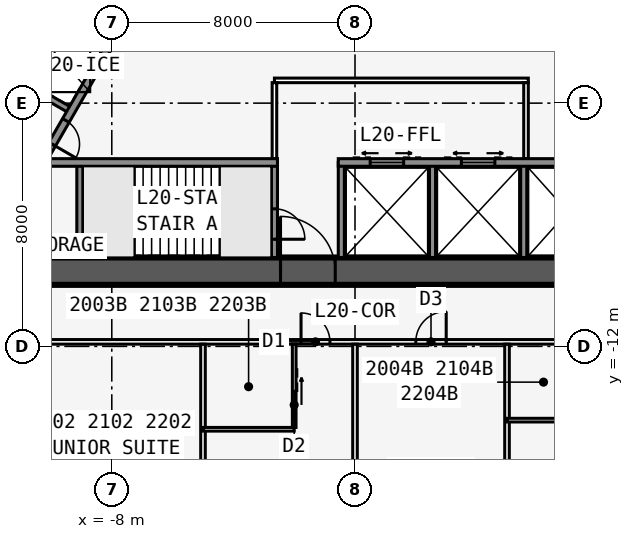
"""IFC4 building model, lengths in metres.
Left out: names, types, materials, properties, quantities, classifications, styles, units other than length and angle.
Written with IfcOpenShell. Run it as: python <this file> out.ifc"""

import sys

from ifc_helpers import new_model, si_unit, direction, frame, frame_2d, origin, place, context, subcontext, project, spatial, rectangle, extrude, element, fill, save


model = new_model("IFC4")
c1 = context("Model", 3, precision=1e-05, world=origin(), true_north=direction((0.0, 1.0)))
c2 = subcontext(c1, "Body", "Model", "MODEL_VIEW")
j1 = project(units=[si_unit("LENGTHUNIT", "METRE"), si_unit("PLANEANGLEUNIT", "RADIAN")], contexts=[c1])
p1 = place(None, origin())
s1 = spatial("IfcSite", under=j1, at=p1, CompositionType="ELEMENT")
p2 = place(p1, origin())
s2 = spatial("IfcBuilding", under=s1, at=p2, CompositionType="ELEMENT")
p3 = place(p2, frame((0.0, 0.0, 79.5)))
s3 = spatial("IfcBuildingStorey", under=s2, at=p3, CompositionType="ELEMENT", Elevation=79.5)
p4 = place(p3, frame((-16.5, -9.526, 0.0), z_axis=(0.0, 0.0, 1.0), x_axis=(1.0, 0.0, 0.0)))
e1 = element("IfcWall", 1, at=p4, inside=s3, PredefinedType="SHEAR", context=c2, shape_type="SweptSolid", body=[
    extrude(rectangle(XDim=33.0, YDim=0.9, at=frame_2d((16.5, 0.0))), origin(), (0.0, 0.0, 1.0), 3.4),
])
p5 = place(p4, frame((14.05, 0.0, 0.0)))
e2 = element("IfcOpeningElement", 2, at=p5, cuts=e1, PredefinedType="OPENING", context=c2, shape_type="SweptSolid", body=[
    extrude(rectangle(XDim=1.8, YDim=2.13, at=frame_2d((0.9, 1.065))), frame((0.0, 0.46, 0.0), z_axis=(0.0, -1.0, 0.0), x_axis=(1.0, 0.0, 0.0)), (0.0, 0.0, 1.0), 0.92),
])
p6 = place(p3, frame((-10.183, -5.951, 0.0), z_axis=(0.0, 0.0, 1.0), x_axis=(1.0, 0.0, 0.0)))
e3 = element("IfcWall", 3, at=p6, inside=s3, PredefinedType="SOLIDWALL", context=c2, shape_type="SweptSolid", body=[
    extrude(rectangle(XDim=7.633, YDim=0.25, at=frame_2d((3.816, 0.0))), origin(), (0.0, 0.0, 1.0), 3.235),
])
p7 = place(p3, frame((-0.55, -5.951, 0.0), z_axis=(0.0, 0.0, 1.0), x_axis=(1.0, 0.0, 0.0)))
e4 = element("IfcWall", 4, at=p7, inside=s3, PredefinedType="SOLIDWALL", context=c2, shape_type="SweptSolid", body=[
    extrude(rectangle(XDim=10.733, YDim=0.25, at=frame_2d((5.366, 0.0))), origin(), (0.0, 0.0, 1.0), 3.235),
])
p8 = place(p7, frame((9.314, 0.0, 0.0)))
e5 = element("IfcOpeningElement", 5, at=p8, cuts=e4, PredefinedType="OPENING", context=c2, shape_type="SweptSolid", body=[
    extrude(rectangle(XDim=0.9, YDim=2.13, at=frame_2d((0.45, 1.065))), frame((0.0, 0.135, 0.0), z_axis=(0.0, -1.0, 0.0), x_axis=(1.0, 0.0, 0.0)), (0.0, 0.0, 1.0), 0.27),
])
p9 = place(p7, frame((1.05, 0.0, 0.0)))
e6 = element("IfcOpeningElement", 6, at=p9, cuts=e4, PredefinedType="OPENING", context=c2, shape_type="SweptSolid", body=[
    extrude(rectangle(XDim=1.1, YDim=2.13, at=frame_2d((0.55, 1.065))), frame((0.0, 0.135, 0.0), z_axis=(0.0, -1.0, 0.0), x_axis=(1.0, 0.0, 0.0)), (0.0, 0.0, 1.0), 0.27),
])
p10 = place(p7, frame((4.05, 0.0, 0.0)))
e7 = element("IfcOpeningElement", 7, at=p10, cuts=e4, PredefinedType="OPENING", context=c2, shape_type="SweptSolid", body=[
    extrude(rectangle(XDim=1.1, YDim=2.13, at=frame_2d((0.55, 1.065))), frame((0.0, 0.135, 0.0), z_axis=(0.0, -1.0, 0.0), x_axis=(1.0, 0.0, 0.0)), (0.0, 0.0, 1.0), 0.27),
])
p11 = place(p3, frame((-9.05, -5.951, 0.0), z_axis=(0.0, 0.0, 1.0), x_axis=(0.0, -1.0, 0.0)))
e8 = element("IfcWall", 8, at=p11, inside=s3, PredefinedType="SOLIDWALL", context=c2, shape_type="SweptSolid", body=[
    extrude(rectangle(XDim=3.125, YDim=0.2, at=frame_2d((1.562, 0.0))), origin(), (0.0, 0.0, 1.0), 3.235),
])
p12 = place(p3, frame((-2.65, -5.951, 0.0), z_axis=(0.0, 0.0, 1.0), x_axis=(0.0, -1.0, 0.0)))
e9 = element("IfcWall", 9, at=p12, inside=s3, PredefinedType="SOLIDWALL", context=c2, shape_type="SweptSolid", body=[
    extrude(rectangle(XDim=3.125, YDim=0.2, at=frame_2d((1.562, 0.0))), origin(), (0.0, 0.0, 1.0), 3.235),
])
p13 = place(p12, frame((1.525, 0.0, 0.0)))
e10 = element("IfcOpeningElement", 10, at=p13, cuts=e9, PredefinedType="OPENING", context=c2, shape_type="SweptSolid", body=[
    extrude(rectangle(XDim=1.0, YDim=2.13, at=frame_2d((0.5, 1.065))), frame((0.0, 0.11, 0.0), z_axis=(0.0, -1.0, 0.0), x_axis=(1.0, 0.0, 0.0)), (0.0, 0.0, 1.0), 0.22),
])
for number, where, z_axis, x_axis in (
    (11, (-0.45, -5.951, 0.0), (0.0, 0.0, 1.0), (0.0, -1.0, 0.0)),
    (12, (2.55, -5.951, 0.0), (0.0, 0.0, 1.0), (0.0, -1.0, 0.0)),
    (13, (5.55, -5.951, 0.0), (0.0, 0.0, 1.0), (0.0, -1.0, 0.0)),
):
    element("IfcWall", number, at=place(p3, frame(where, z_axis=z_axis, x_axis=x_axis)), inside=s3, PredefinedType="SOLIDWALL", context=c2, shape_type="SweptSolid", body=[
        extrude(rectangle(XDim=3.125, YDim=0.2, at=frame_2d((1.562, 0.0))), origin(), (0.0, 0.0, 1.0), 3.235),
    ])
p14 = place(p3, frame((16.5, -9.526, 0.0), z_axis=(0.0, 0.0, 1.0), x_axis=(-0.499999749417, 0.866025548458, 0.0)))
e14 = element("IfcWall", 14, at=p14, inside=s3, PredefinedType="SHEAR", context=c2, shape_type="SweptSolid", body=[
    extrude(rectangle(XDim=33.0, YDim=0.9, at=frame_2d((16.5, 0.0))), origin(), (0.0, 0.0, 1.0), 3.4),
])
p15 = place(p14, frame((14.15, 0.0, 0.0)))
e15 = element("IfcOpeningElement", 15, at=p15, cuts=e14, PredefinedType="OPENING", context=c2, shape_type="SweptSolid", body=[
    extrude(rectangle(XDim=1.8, YDim=2.13, at=frame_2d((0.9, 1.065))), frame((0.0, 0.46, 0.0), z_axis=(0.0, -1.0, 0.0), x_axis=(1.0, 0.0, 0.0)), (0.0, 0.0, 1.0), 0.92),
])
p16 = place(p14, frame((12.6, 0.0, 0.0)))
e16 = element("IfcOpeningElement", 16, at=p16, cuts=e14, PredefinedType="OPENING", context=c2, shape_type="SweptSolid", body=[
    extrude(rectangle(XDim=1.0, YDim=2.13, at=frame_2d((0.5, 1.065))), frame((0.0, 0.46, 0.0), z_axis=(0.0, -1.0, 0.0), x_axis=(1.0, 0.0, 0.0)), (0.0, 0.0, 1.0), 0.92),
])
p17 = place(p3, frame((10.245, -5.843, 0.0), z_axis=(0.0, 0.0, 1.0), x_axis=(-0.499993009313, 0.866029439822, 0.0)))
e17 = element("IfcWall", 17, at=p17, inside=s3, PredefinedType="SOLIDWALL", context=c2, shape_type="SweptSolid", body=[
    extrude(rectangle(XDim=7.733, YDim=0.25, at=frame_2d((3.866, 0.0))), origin(), (0.0, 0.0, 1.0), 3.235),
])
p18 = place(p3, frame((0.0, 19.052, 0.0), z_axis=(0.0, 0.0, 1.0), x_axis=(-0.499999749417, -0.866025548458, 0.0)))
e18 = element("IfcWall", 18, at=p18, inside=s3, PredefinedType="SHEAR", context=c2, shape_type="SweptSolid", body=[
    extrude(rectangle(XDim=33.0, YDim=0.9, at=frame_2d((16.5, 0.0))), origin(), (0.0, 0.0, 1.0), 3.4),
])
p19 = place(p18, frame((14.15, 0.0, 0.0)))
e19 = element("IfcOpeningElement", 19, at=p19, cuts=e18, PredefinedType="OPENING", context=c2, shape_type="SweptSolid", body=[
    extrude(rectangle(XDim=1.8, YDim=2.13, at=frame_2d((0.9, 1.065))), frame((0.0, 0.46, 0.0), z_axis=(0.0, -1.0, 0.0), x_axis=(1.0, 0.0, 0.0)), (0.0, 0.0, 1.0), 0.92),
])
p20 = place(p18, frame((12.6, 0.0, 0.0)))
e20 = element("IfcOpeningElement", 20, at=p20, cuts=e18, PredefinedType="OPENING", context=c2, shape_type="SweptSolid", body=[
    extrude(rectangle(XDim=1.0, YDim=2.13, at=frame_2d((0.5, 1.065))), frame((0.0, 0.46, 0.0), z_axis=(0.0, -1.0, 0.0), x_axis=(1.0, 0.0, 0.0)), (0.0, 0.0, 1.0), 0.92),
])
p21 = place(p3, frame((-4.929, 3.365, 0.0), z_axis=(0.0, 0.0, 1.0), x_axis=(-0.499991433582, -0.866030349552, 0.0)))
e21 = element("IfcWall", 21, at=p21, inside=s3, PredefinedType="SOLIDWALL", context=c2, shape_type="SweptSolid", body=[
    extrude(rectangle(XDim=10.633, YDim=0.25, at=frame_2d((5.316, 0.0))), origin(), (0.0, 0.0, 1.0), 3.235),
])
p22 = place(p21, frame((9.164, 0.0, 0.0)))
e22 = element("IfcOpeningElement", 22, at=p22, cuts=e21, PredefinedType="OPENING", context=c2, shape_type="SweptSolid", body=[
    extrude(rectangle(XDim=0.9, YDim=2.13, at=frame_2d((0.45, 1.065))), frame((0.0, 0.135, 0.0), z_axis=(0.0, -1.0, 0.0), x_axis=(1.0, 0.0, 0.0)), (0.0, 0.0, 1.0), 0.27),
])
p23 = place(p3, frame((-9.329, -4.256, 0.0), z_axis=(0.0, 0.0, 1.0), x_axis=(-0.866022959057, 0.500004234368, 0.0)))
e23 = element("IfcWall", 23, at=p23, inside=s3, PredefinedType="SOLIDWALL", context=c2, shape_type="SweptSolid", body=[
    extrude(rectangle(XDim=3.125, YDim=0.2, at=frame_2d((1.562, 0.0))), origin(), (0.0, 0.0, 1.0), 3.235),
])
p24 = place(p3, frame((-19.527, -11.851, 0.0), z_axis=(0.0, 0.0, 1.0), x_axis=(1.0, 0.0, 0.0)))
e24 = element("IfcWall", 24, at=p24, inside=s3, PredefinedType="PARTITIONING", context=c2, shape_type="SweptSolid", body=[
    extrude(rectangle(XDim=39.054, YDim=0.15, at=frame_2d((19.527, 0.0))), origin(), (0.0, 0.0, 1.0), 3.235),
])
p25 = place(p24, frame((0.352, 0.0, 0.0)))
e25 = element("IfcOpeningElement", 25, at=p25, cuts=e24, PredefinedType="OPENING", context=c2, shape_type="SweptSolid", body=[
    extrude(rectangle(XDim=0.95, YDim=2.13, at=frame_2d((0.475, 1.065))), frame((0.0, 0.085, 0.0), z_axis=(0.0, -1.0, 0.0), x_axis=(1.0, 0.0, 0.0)), (0.0, 0.0, 1.0), 0.17),
])
p26 = place(p24, frame((7.752, 0.0, 0.0)))
e26 = element("IfcOpeningElement", 26, at=p26, cuts=e24, PredefinedType="OPENING", context=c2, shape_type="SweptSolid", body=[
    extrude(rectangle(XDim=0.95, YDim=2.13, at=frame_2d((0.475, 1.065))), frame((0.0, 0.085, 0.0), z_axis=(0.0, -1.0, 0.0), x_axis=(1.0, 0.0, 0.0)), (0.0, 0.0, 1.0), 0.17),
])
p27 = place(p24, frame((17.752, 0.0, 0.0)))
e27 = element("IfcOpeningElement", 27, at=p27, cuts=e24, PredefinedType="OPENING", context=c2, shape_type="SweptSolid", body=[
    extrude(rectangle(XDim=0.95, YDim=2.13, at=frame_2d((0.475, 1.065))), frame((0.0, 0.085, 0.0), z_axis=(0.0, -1.0, 0.0), x_axis=(1.0, 0.0, 0.0)), (0.0, 0.0, 1.0), 0.17),
])
p28 = place(p24, frame((21.527, 0.0, 0.0)))
e28 = element("IfcOpeningElement", 28, at=p28, cuts=e24, PredefinedType="OPENING", context=c2, shape_type="SweptSolid", body=[
    extrude(rectangle(XDim=1.0, YDim=2.13, at=frame_2d((0.5, 1.065))), frame((0.0, 0.085, 0.0), z_axis=(0.0, -1.0, 0.0), x_axis=(1.0, 0.0, 0.0)), (0.0, 0.0, 1.0), 0.17),
])
p29 = place(p24, frame((27.152, 0.0, 0.0)))
e29 = element("IfcOpeningElement", 29, at=p29, cuts=e24, PredefinedType="OPENING", context=c2, shape_type="SweptSolid", body=[
    extrude(rectangle(XDim=0.95, YDim=2.13, at=frame_2d((0.475, 1.065))), frame((0.0, 0.085, 0.0), z_axis=(0.0, -1.0, 0.0), x_axis=(1.0, 0.0, 0.0)), (0.0, 0.0, 1.0), 0.17),
])
p30 = place(p24, frame((32.152, 0.0, 0.0)))
e30 = element("IfcOpeningElement", 30, at=p30, cuts=e24, PredefinedType="OPENING", context=c2, shape_type="SweptSolid", body=[
    extrude(rectangle(XDim=0.95, YDim=2.13, at=frame_2d((0.475, 1.065))), frame((0.0, 0.085, 0.0), z_axis=(0.0, -1.0, 0.0), x_axis=(1.0, 0.0, 0.0)), (0.0, 0.0, 1.0), 0.17),
])
p31 = place(p24, frame((37.752, 0.0, 0.0)))
e31 = element("IfcOpeningElement", 31, at=p31, cuts=e24, PredefinedType="OPENING", context=c2, shape_type="SweptSolid", body=[
    extrude(rectangle(XDim=0.95, YDim=2.13, at=frame_2d((0.475, 1.065))), frame((0.0, 0.085, 0.0), z_axis=(0.0, -1.0, 0.0), x_axis=(1.0, 0.0, 0.0)), (0.0, 0.0, 1.0), 0.17),
])
p32 = place(p3, frame((-5.0, -11.926, 0.0), z_axis=(0.0, 0.0, 1.0), x_axis=(0.0, -1.0, 0.0)))
e32 = element("IfcWall", 32, at=p32, inside=s3, PredefinedType="PARTITIONING", context=c2, shape_type="SweptSolid", body=[
    extrude(rectangle(XDim=9.943, YDim=0.15, at=frame_2d((4.972, 0.0))), origin(), (0.0, 0.0, 1.0), 2.389),
])
p33 = place(p3, frame((0.0, -11.926, 0.0), z_axis=(0.0, 0.0, 1.0), x_axis=(0.0, -1.0, 0.0)))
e33 = element("IfcWall", 33, at=p33, inside=s3, PredefinedType="PARTITIONING", context=c2, shape_type="SweptSolid", body=[
    extrude(rectangle(XDim=10.096, YDim=0.15, at=frame_2d((5.048, 0.0))), origin(), (0.0, 0.0, 1.0), 2.389),
])
p34 = place(p3, frame((5.0, -11.926, 0.0), z_axis=(0.0, 0.0, 1.0), x_axis=(0.0, -1.0, 0.0)))
e34 = element("IfcWall", 34, at=p34, inside=s3, PredefinedType="PARTITIONING", context=c2, shape_type="SweptSolid", body=[
    extrude(rectangle(XDim=9.943, YDim=0.15, at=frame_2d((4.972, 0.0))), origin(), (0.0, 0.0, 1.0), 2.389),
])
p35 = place(p3, frame((-5.0, -14.726, 0.0), z_axis=(0.0, 0.0, 1.0), x_axis=(1.0, 0.0, 0.0)))
e35 = element("IfcWall", 35, at=p35, inside=s3, PredefinedType="PLUMBINGWALL", context=c2, shape_type="SweptSolid", body=[
    extrude(rectangle(XDim=3.0, YDim=0.12, at=frame_2d((1.5, 0.0))), origin(), (0.0, 0.0, 1.0), 3.235),
])
p36 = place(p3, frame((-2.0, -11.926, 0.0), z_axis=(0.0, 0.0, 1.0), x_axis=(0.0, -1.0, 0.0)))
e36 = element("IfcWall", 36, at=p36, inside=s3, PredefinedType="PLUMBINGWALL", context=c2, shape_type="SweptSolid", body=[
    extrude(rectangle(XDim=2.74, YDim=0.12, at=frame_2d((1.37, 0.0))), origin(), (0.0, 0.0, 1.0), 3.235),
])
p37 = place(p36, frame((1.55, 0.0, 0.0)))
e37 = element("IfcOpeningElement", 37, at=p37, cuts=e36, PredefinedType="OPENING", context=c2, shape_type="SweptSolid", body=[
    extrude(rectangle(XDim=0.9, YDim=2.13, at=frame_2d((0.45, 1.065))), frame((0.0, 0.07, 0.0), z_axis=(0.0, -1.0, 0.0), x_axis=(1.0, 0.0, 0.0)), (0.0, 0.0, 1.0), 0.14),
])
p38 = place(p3, frame((5.0, -14.426, 0.0), z_axis=(0.0, 0.0, 1.0), x_axis=(1.0, 0.0, 0.0)))
e38 = element("IfcWall", 38, at=p38, inside=s3, PredefinedType="PLUMBINGWALL", context=c2, shape_type="SweptSolid", body=[
    extrude(rectangle(XDim=2.4, YDim=0.12, at=frame_2d((1.2, 0.0))), origin(), (0.0, 0.0, 1.0), 3.235),
])
p39 = place(p3, frame((21.586, -11.885, 0.0), z_axis=(0.0, 0.0, 1.0), x_axis=(-0.500001915564, 0.86602429783, 0.0)))
e39 = element("IfcWall", 39, at=p39, inside=s3, PredefinedType="PARTITIONING", context=c2, shape_type="SweptSolid", body=[
    extrude(rectangle(XDim=42.172, YDim=0.15, at=frame_2d((21.086, 0.0))), origin(), (0.0, 0.0, 1.0), 3.235),
])
p40 = place(p39, frame((1.911, 0.0, 0.0)))
e40 = element("IfcOpeningElement", 40, at=p40, cuts=e39, PredefinedType="OPENING", context=c2, shape_type="SweptSolid", body=[
    extrude(rectangle(XDim=0.95, YDim=2.13, at=frame_2d((0.475, 1.065))), frame((0.0, 0.085, 0.0), z_axis=(0.0, -1.0, 0.0), x_axis=(1.0, 0.0, 0.0)), (0.0, 0.0, 1.0), 0.17),
])
p41 = place(p39, frame((8.711, 0.0, 0.0)))
e41 = element("IfcOpeningElement", 41, at=p41, cuts=e39, PredefinedType="OPENING", context=c2, shape_type="SweptSolid", body=[
    extrude(rectangle(XDim=0.95, YDim=2.13, at=frame_2d((0.475, 1.065))), frame((0.0, 0.085, 0.0), z_axis=(0.0, -1.0, 0.0), x_axis=(1.0, 0.0, 0.0)), (0.0, 0.0, 1.0), 0.17),
])
p42 = place(p39, frame((13.111, 0.0, 0.0)))
e42 = element("IfcOpeningElement", 42, at=p42, cuts=e39, PredefinedType="OPENING", context=c2, shape_type="SweptSolid", body=[
    extrude(rectangle(XDim=0.95, YDim=2.13, at=frame_2d((0.475, 1.065))), frame((0.0, 0.085, 0.0), z_axis=(0.0, -1.0, 0.0), x_axis=(1.0, 0.0, 0.0)), (0.0, 0.0, 1.0), 0.17),
])
p43 = place(p39, frame((23.711, 0.0, 0.0)))
e43 = element("IfcOpeningElement", 43, at=p43, cuts=e39, PredefinedType="OPENING", context=c2, shape_type="SweptSolid", body=[
    extrude(rectangle(XDim=0.95, YDim=2.13, at=frame_2d((0.475, 1.065))), frame((0.0, 0.085, 0.0), z_axis=(0.0, -1.0, 0.0), x_axis=(1.0, 0.0, 0.0)), (0.0, 0.0, 1.0), 0.17),
])
p44 = place(p39, frame((29.311, 0.0, 0.0)))
e44 = element("IfcOpeningElement", 44, at=p44, cuts=e39, PredefinedType="OPENING", context=c2, shape_type="SweptSolid", body=[
    extrude(rectangle(XDim=0.95, YDim=2.13, at=frame_2d((0.475, 1.065))), frame((0.0, 0.085, 0.0), z_axis=(0.0, -1.0, 0.0), x_axis=(1.0, 0.0, 0.0)), (0.0, 0.0, 1.0), 0.17),
])
p45 = place(p39, frame((39.311, 0.0, 0.0)))
e45 = element("IfcOpeningElement", 45, at=p45, cuts=e39, PredefinedType="OPENING", context=c2, shape_type="SweptSolid", body=[
    extrude(rectangle(XDim=0.95, YDim=2.13, at=frame_2d((0.475, 1.065))), frame((0.0, 0.085, 0.0), z_axis=(0.0, -1.0, 0.0), x_axis=(1.0, 0.0, 0.0)), (0.0, 0.0, 1.0), 0.17),
])
p46 = place(p3, frame((-0.5, 22.836, 0.0), z_axis=(0.0, 0.0, 1.0), x_axis=(-0.500001677587, -0.866024435227, 0.0)))
e46 = element("IfcWall", 46, at=p46, inside=s3, PredefinedType="PARTITIONING", context=c2, shape_type="SweptSolid", body=[
    extrude(rectangle(XDim=39.054, YDim=0.15, at=frame_2d((19.527, 0.0))), origin(), (0.0, 0.0, 1.0), 3.235),
])
p47 = place(p46, frame((0.352, 0.0, 0.0)))
e47 = element("IfcOpeningElement", 47, at=p47, cuts=e46, PredefinedType="OPENING", context=c2, shape_type="SweptSolid", body=[
    extrude(rectangle(XDim=0.95, YDim=2.13, at=frame_2d((0.475, 1.065))), frame((0.0, 0.085, 0.0), z_axis=(0.0, -1.0, 0.0), x_axis=(1.0, 0.0, 0.0)), (0.0, 0.0, 1.0), 0.17),
])
p48 = place(p46, frame((11.552, 0.0, 0.0)))
e48 = element("IfcOpeningElement", 48, at=p48, cuts=e46, PredefinedType="OPENING", context=c2, shape_type="SweptSolid", body=[
    extrude(rectangle(XDim=0.95, YDim=2.13, at=frame_2d((0.475, 1.065))), frame((0.0, 0.085, 0.0), z_axis=(0.0, -1.0, 0.0), x_axis=(1.0, 0.0, 0.0)), (0.0, 0.0, 1.0), 0.17),
])
p49 = place(p46, frame((21.552, 0.0, 0.0)))
e49 = element("IfcOpeningElement", 49, at=p49, cuts=e46, PredefinedType="OPENING", context=c2, shape_type="SweptSolid", body=[
    extrude(rectangle(XDim=0.95, YDim=2.13, at=frame_2d((0.475, 1.065))), frame((0.0, 0.085, 0.0), z_axis=(0.0, -1.0, 0.0), x_axis=(1.0, 0.0, 0.0)), (0.0, 0.0, 1.0), 0.17),
])
p50 = place(p46, frame((36.546, 0.0, 0.0)))
e50 = element("IfcOpeningElement", 50, at=p50, cuts=e46, PredefinedType="OPENING", context=c2, shape_type="SweptSolid", body=[
    extrude(rectangle(XDim=0.95, YDim=2.13, at=frame_2d((0.475, 1.065))), frame((0.0, 0.085, 0.0), z_axis=(0.0, -1.0, 0.0), x_axis=(1.0, 0.0, 0.0)), (0.0, 0.0, 1.0), 0.17),
])
p51 = place(p3, frame((-2.65, -3.251, 0.0), z_axis=(0.0, 0.0, 1.0), x_axis=(1.0, 0.0, 0.0)))
e51 = element("IfcWall", 51, at=p51, inside=s3, PredefinedType="PARTITIONING", context=c2, shape_type="SweptSolid", body=[
    extrude(rectangle(XDim=8.35, YDim=0.15, at=frame_2d((4.175, 0.0))), origin(), (0.0, 0.0, 1.0), 3.235),
])
for number, where, z_axis, x_axis in (
    (52, (-2.65, -5.826, 0.0), (0.0, 0.0, 1.0), (0.0, 1.0, 0.0)),
    (53, (5.625, -5.826, 0.0), (0.0, 0.0, 1.0), (0.0, 1.0, 0.0)),
):
    element("IfcWall", number, at=place(p3, frame(where, z_axis=z_axis, x_axis=x_axis)), inside=s3, PredefinedType="PARTITIONING", context=c2, shape_type="SweptSolid", body=[
        extrude(rectangle(XDim=2.5, YDim=0.15, at=frame_2d((1.25, 0.0))), origin(), (0.0, 0.0, 1.0), 3.235),
    ])
p52 = place(p3, frame((-9.947, -9.076, 0.0), z_axis=(0.0, 0.0, 1.0), x_axis=(-0.500027479704, 0.866009537788, 0.0)))
e54 = element("IfcWall", 54, at=p52, inside=s3, PredefinedType="PARTITIONING", context=c2, shape_type="SweptSolid", body=[
    extrude(rectangle(XDim=5.774, YDim=0.1, at=frame_2d((2.887, 0.0))), origin(), (0.0, 0.0, 1.0), 3.235),
])
p53 = place(p52, frame((2.437, 0.0, 0.0)))
e55 = element("IfcOpeningElement", 55, at=p53, cuts=e54, PredefinedType="OPENING", context=c2, shape_type="SweptSolid", body=[
    extrude(rectangle(XDim=0.9, YDim=2.13, at=frame_2d((0.45, 1.065))), frame((0.0, 0.06, 0.0), z_axis=(0.0, -1.0, 0.0), x_axis=(1.0, 0.0, 0.0)), (0.0, 0.0, 1.0), 0.12),
])
p54 = place(p3, frame((-7.247, -7.576, 0.0), z_axis=(0.0, 0.0, 1.0), x_axis=(1.0, 0.0, 0.0)))
e56 = element("IfcWall", 56, at=p54, inside=s3, PredefinedType="SOLIDWALL", context=c2, shape_type="SweptSolid", body=[
    extrude(rectangle(XDim=2.794, YDim=0.1, at=frame_2d((1.397, 0.0))), origin(), (0.0, 0.0, 1.0), 3.4),
])
p55 = place(p37, origin())
e57 = element("IfcDoor", 57, at=p55, inside=s3, OperationType="SLIDING_TO_LEFT", PredefinedType="DOOR", context=c2, shape_type="SweptSolid", body=[
    extrude(rectangle(XDim=0.9, YDim=2.13, at=frame_2d((0.45, 1.065))), frame((0.0, 0.025, 0.0), z_axis=(0.0, -1.0, 0.0), x_axis=(1.0, 0.0, 0.0)), (0.0, 0.0, 1.0), 0.05),
])
fill(e37, e57)
p56 = place(p27, origin())
e58 = element("IfcDoor", 58, at=p56, inside=s3, OperationType="SINGLE_SWING_LEFT", PredefinedType="DOOR", context=c2, shape_type="SweptSolid", body=[
    extrude(rectangle(XDim=0.95, YDim=2.13, at=frame_2d((0.475, 1.065))), frame((0.0, 0.025, 0.0), z_axis=(0.0, -1.0, 0.0), x_axis=(1.0, 0.0, 0.0)), (0.0, 0.0, 1.0), 0.05),
])
fill(e27, e58)
p57 = place(p28, origin())
e59 = element("IfcDoor", 59, at=p57, inside=s3, OperationType="SINGLE_SWING_RIGHT", PredefinedType="DOOR", context=c2, shape_type="SweptSolid", body=[
    extrude(rectangle(XDim=1.0, YDim=2.13, at=frame_2d((0.5, 1.065))), frame((0.0, 0.025, 0.0), z_axis=(0.0, -1.0, 0.0), x_axis=(1.0, 0.0, 0.0)), (0.0, 0.0, 1.0), 0.05),
])
fill(e28, e59)
p58 = place(p5, origin())
e60 = element("IfcDoor", 60, at=p58, inside=s3, OperationType="DOUBLE_DOOR_SINGLE_SWING", PredefinedType="DOOR", context=c2, shape_type="SweptSolid", body=[
    extrude(rectangle(XDim=1.8, YDim=2.13, at=frame_2d((0.9, 1.065))), frame((0.0, 0.025, 0.0), z_axis=(0.0, -1.0, 0.0), x_axis=(1.0, 0.0, 0.0)), (0.0, 0.0, 1.0), 0.05),
])
fill(e2, e60)
p59 = place(p13, origin())
e61 = element("IfcDoor", 61, at=p59, inside=s3, OperationType="SINGLE_SWING_RIGHT", PredefinedType="DOOR", context=c2, shape_type="SweptSolid", body=[
    extrude(rectangle(XDim=1.0, YDim=2.13, at=frame_2d((0.5, 1.065))), frame((0.0, 0.025, 0.0), z_axis=(0.0, -1.0, 0.0), x_axis=(1.0, 0.0, 0.0)), (0.0, 0.0, 1.0), 0.05),
])
fill(e10, e61)
p60 = place(p22, origin())
e62 = element("IfcDoor", 62, at=p60, inside=s3, OperationType="SINGLE_SWING_RIGHT", PredefinedType="DOOR", context=c2, shape_type="SweptSolid", body=[
    extrude(rectangle(XDim=0.9, YDim=2.13, at=frame_2d((0.45, 1.065))), frame((0.0, 0.025, 0.0), z_axis=(0.0, -1.0, 0.0), x_axis=(1.0, 0.0, 0.0)), (0.0, 0.0, 1.0), 0.05),
])
fill(e22, e62)
p61 = place(p9, origin())
e63 = element("IfcDoor", 63, at=p61, inside=s3, OperationType="DOUBLE_DOOR_SLIDING", PredefinedType="USERDEFINED", context=c2, shape_type="SweptSolid", body=[
    extrude(rectangle(XDim=1.1, YDim=2.13, at=frame_2d((0.55, 1.065))), frame((0.0, 0.025, 0.0), z_axis=(0.0, -1.0, 0.0), x_axis=(1.0, 0.0, 0.0)), (0.0, 0.0, 1.0), 0.05),
])
fill(e6, e63)
p62 = place(p10, origin())
e64 = element("IfcDoor", 64, at=p62, inside=s3, OperationType="DOUBLE_DOOR_SLIDING", PredefinedType="USERDEFINED", context=c2, shape_type="SweptSolid", body=[
    extrude(rectangle(XDim=1.1, YDim=2.13, at=frame_2d((0.55, 1.065))), frame((0.0, 0.025, 0.0), z_axis=(0.0, -1.0, 0.0), x_axis=(1.0, 0.0, 0.0)), (0.0, 0.0, 1.0), 0.05),
])
fill(e7, e64)
save(model, sys.argv[1])
